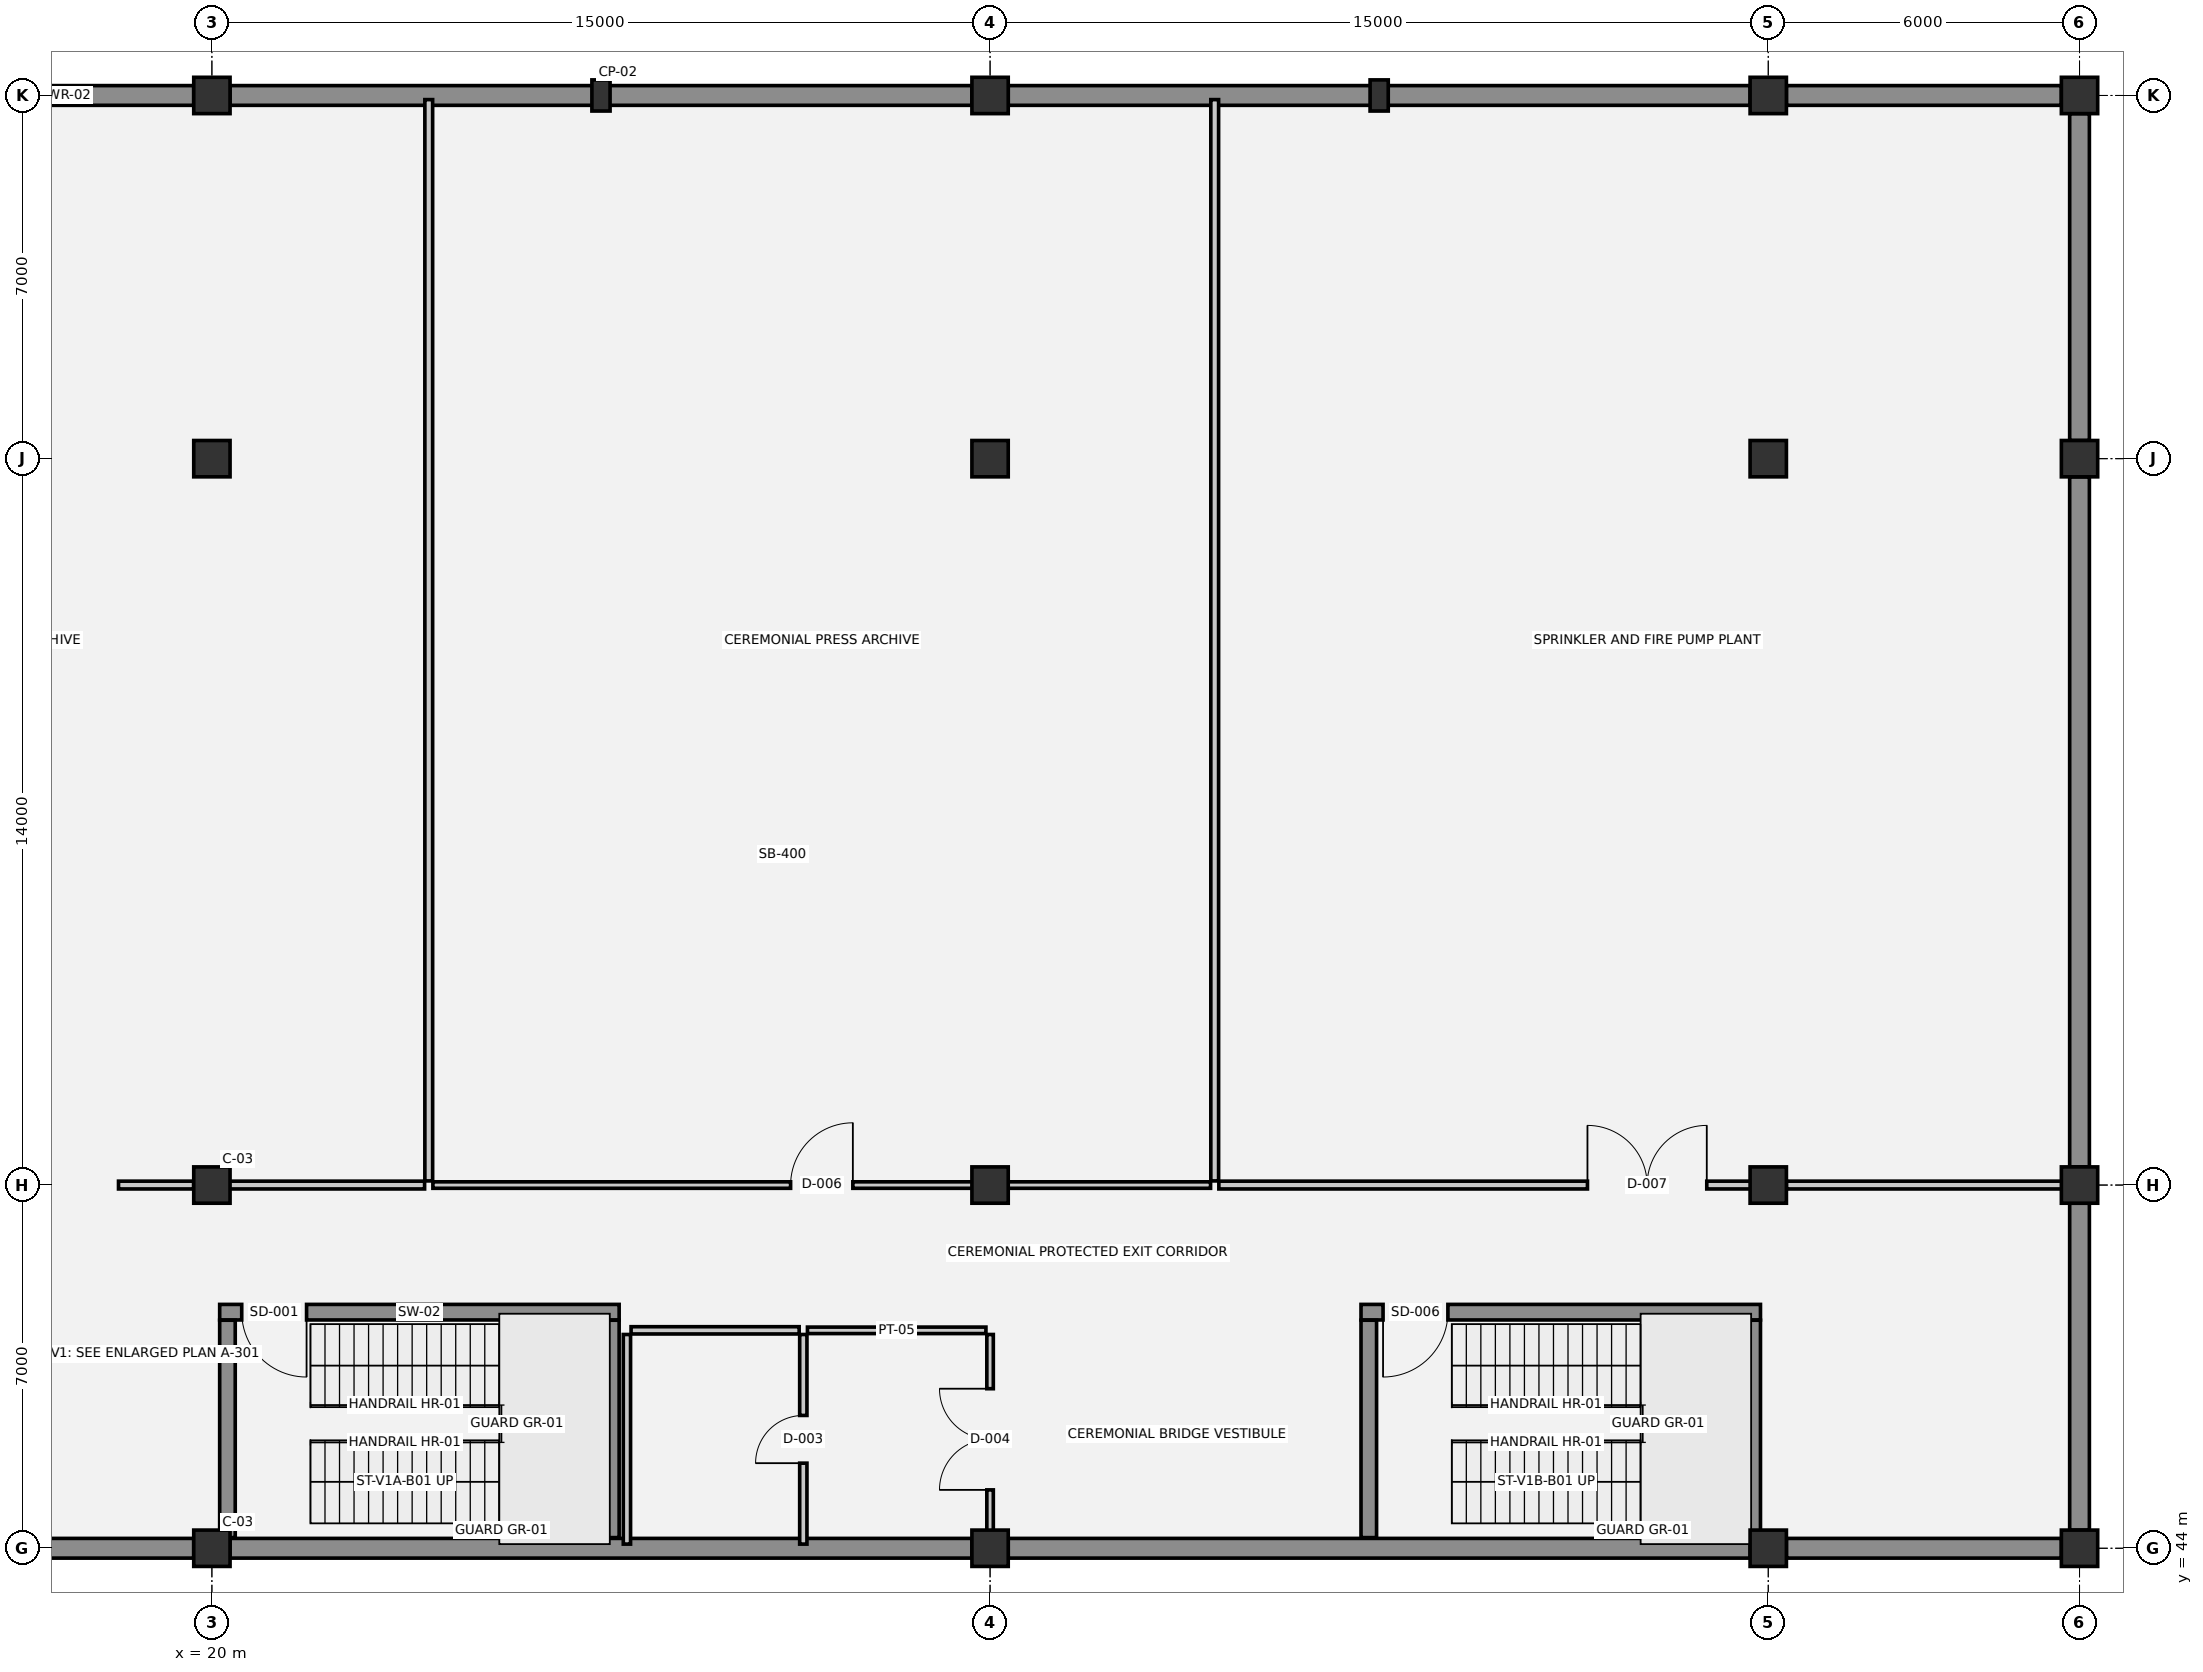
"""IFC4 building model, lengths in metres.
Left out: names, types, materials, properties, quantities, classifications, styles, units other than length and angle.
Written with IfcOpenShell. Run it as: python <this file> out.ifc"""

import sys

from ifc_helpers import new_model, si_unit, direction, frame, frame_2d, origin, origin_2d, place, context, subcontext, project, spatial, rectangle, extrude, element, fill, save


model = new_model("IFC4")
c1 = context("Model", 3, precision=1e-05, world=origin(), true_north=direction((0.0, 1.0)))
c2 = subcontext(c1, "Body", "Model", "MODEL_VIEW")
j1 = project(units=[si_unit("LENGTHUNIT", "METRE"), si_unit("PLANEANGLEUNIT", "RADIAN")], contexts=[c1])
p1 = place(None, origin())
s1 = spatial("IfcSite", under=j1, at=p1, CompositionType="ELEMENT")
p2 = place(p1, origin())
s2 = spatial("IfcBuilding", under=s1, at=p2, CompositionType="ELEMENT")
p3 = place(p2, frame((0.0, 0.0, -4.5)))
s3 = spatial("IfcBuildingStorey", under=s2, at=p3, CompositionType="ELEMENT", Elevation=-4.5)
for number, where, z_axis, x_axis in (
    (1, (20.0, 44.0, 0.0), (0.0, 0.0, 1.0), (1.0, 0.0, 0.0)),
    (2, (20.0, 51.0, 0.0), (0.0, 0.0, 1.0), (1.0, 0.0, 0.0)),
    (3, (20.0, 65.0, 0.0), (0.0, 0.0, 1.0), (1.0, 0.0, 0.0)),
    (4, (20.0, 72.0, 0.0), (0.0, 0.0, 1.0), (1.0, 0.0, 0.0)),
    (5, (35.0, 44.0, 0.0), (0.0, 0.0, 1.0), (1.0, 0.0, 0.0)),
    (6, (35.0, 51.0, 0.0), (0.0, 0.0, 1.0), (1.0, 0.0, 0.0)),
    (7, (35.0, 65.0, 0.0), (0.0, 0.0, 1.0), (1.0, 0.0, 0.0)),
    (8, (35.0, 72.0, 0.0), (0.0, 0.0, 1.0), (1.0, 0.0, 0.0)),
    (9, (50.0, 44.0, 0.0), (0.0, 0.0, 1.0), (1.0, 0.0, 0.0)),
    (10, (50.0, 51.0, 0.0), (0.0, 0.0, 1.0), (1.0, 0.0, 0.0)),
    (11, (50.0, 65.0, 0.0), (0.0, 0.0, 1.0), (1.0, 0.0, 0.0)),
    (12, (50.0, 72.0, 0.0), (0.0, 0.0, 1.0), (1.0, 0.0, 0.0)),
    (13, (56.0, 44.0, 0.0), (0.0, 0.0, 1.0), (1.0, 0.0, 0.0)),
    (14, (56.0, 51.0, 0.0), (0.0, 0.0, 1.0), (1.0, 0.0, 0.0)),
    (15, (56.0, 65.0, 0.0), (0.0, 0.0, 1.0), (1.0, 0.0, 0.0)),
    (16, (56.0, 72.0, 0.0), (0.0, 0.0, 1.0), (1.0, 0.0, 0.0)),
):
    element("IfcColumn", number, at=place(p3, frame(where, z_axis=z_axis, x_axis=x_axis)), inside=s3, PredefinedType="COLUMN", context=c2, shape_type="SweptSolid", body=[
        extrude(rectangle(XDim=0.7, YDim=0.7, at=origin_2d()), origin(), (0.0, 0.0, 1.0), 4.5),
    ])
for number, where, z_axis, x_axis in (
    (17, (27.5, 72.0, 0.0), (0.0, 0.0, 1.0), (1.0, 0.0, 0.0)),
    (18, (42.5, 72.0, 0.0), (0.0, 0.0, 1.0), (1.0, 0.0, 0.0)),
):
    element("IfcColumn", number, at=place(p3, frame(where, z_axis=z_axis, x_axis=x_axis)), inside=s3, PredefinedType="PILASTER", context=c2, shape_type="SweptSolid", body=[
        extrude(rectangle(XDim=0.35, YDim=0.6, at=origin_2d()), origin(), (0.0, 0.0, 1.0), 4.5),
    ])
p4 = place(p3, frame((14.85, 72.0, 0.0), z_axis=(0.0, 0.0, 1.0), x_axis=(1.0, 0.0, 0.0)))
e19 = element("IfcWall", 19, at=p4, inside=s3, PredefinedType="STANDARD", context=c2, shape_type="SweptSolid", body=[
    extrude(rectangle(XDim=4.8, YDim=0.38, at=frame_2d((2.4, 0.0))), origin(), (0.0, 0.0, 1.0), 4.24),
])
for number, where, z_axis, x_axis in (
    (20, (20.35, 72.0, 0.0), (0.0, 0.0, 1.0), (1.0, 0.0, 0.0)),
    (21, (35.35, 72.0, 0.0), (0.0, 0.0, 1.0), (1.0, 0.0, 0.0)),
):
    element("IfcWall", number, at=place(p3, frame(where, z_axis=z_axis, x_axis=x_axis)), inside=s3, PredefinedType="STANDARD", context=c2, shape_type="SweptSolid", body=[
        extrude(rectangle(XDim=14.3, YDim=0.38, at=frame_2d((7.15, 0.0))), origin(), (0.0, 0.0, 1.0), 4.24),
    ])
p5 = place(p3, frame((50.35, 72.0, 0.0), z_axis=(0.0, 0.0, 1.0), x_axis=(1.0, 0.0, 0.0)))
e22 = element("IfcWall", 22, at=p5, inside=s3, PredefinedType="STANDARD", context=c2, shape_type="SweptSolid", body=[
    extrude(rectangle(XDim=5.3, YDim=0.38, at=frame_2d((2.65, 0.0))), origin(), (0.0, 0.0, 1.0), 4.24),
])
p6 = place(p3, frame((56.0, 71.65, 0.0), z_axis=(0.0, 0.0, 1.0), x_axis=(0.0, -1.0, 0.0)))
e23 = element("IfcWall", 23, at=p6, inside=s3, PredefinedType="STANDARD", context=c2, shape_type="SweptSolid", body=[
    extrude(rectangle(XDim=6.3, YDim=0.38, at=frame_2d((3.15, 0.0))), origin(), (0.0, 0.0, 1.0), 4.24),
])
p7 = place(p3, frame((56.0, 64.65, 0.0), z_axis=(0.0, 0.0, 1.0), x_axis=(0.0, -1.0, 0.0)))
e24 = element("IfcWall", 24, at=p7, inside=s3, PredefinedType="STANDARD", context=c2, shape_type="SweptSolid", body=[
    extrude(rectangle(XDim=13.3, YDim=0.38, at=frame_2d((6.65, 0.0))), origin(), (0.0, 0.0, 1.0), 4.24),
])
p8 = place(p3, frame((56.0, 50.65, 0.0), z_axis=(0.0, 0.0, 1.0), x_axis=(0.0, -1.0, 0.0)))
e25 = element("IfcWall", 25, at=p8, inside=s3, PredefinedType="STANDARD", context=c2, shape_type="SweptSolid", body=[
    extrude(rectangle(XDim=6.3, YDim=0.38, at=frame_2d((3.15, 0.0))), origin(), (0.0, 0.0, 1.0), 4.24),
])
p9 = place(p3, frame((55.65, 44.0, 0.0), z_axis=(0.0, 0.0, 1.0), x_axis=(-1.0, 0.0, 0.0)))
e26 = element("IfcWall", 26, at=p9, inside=s3, PredefinedType="STANDARD", context=c2, shape_type="SweptSolid", body=[
    extrude(rectangle(XDim=5.3, YDim=0.38, at=frame_2d((2.65, 0.0))), origin(), (0.0, 0.0, 1.0), 4.24),
])
for number, where, z_axis, x_axis in (
    (27, (49.65, 44.0, 0.0), (0.0, 0.0, 1.0), (-1.0, 0.0, 0.0)),
    (28, (34.65, 44.0, 0.0), (0.0, 0.0, 1.0), (-1.0, 0.0, 0.0)),
):
    element("IfcWall", number, at=place(p3, frame(where, z_axis=z_axis, x_axis=x_axis)), inside=s3, PredefinedType="STANDARD", context=c2, shape_type="SweptSolid", body=[
        extrude(rectangle(XDim=14.3, YDim=0.38, at=frame_2d((7.15, 0.0))), origin(), (0.0, 0.0, 1.0), 4.24),
    ])
p10 = place(p3, frame((19.65, 44.0, 0.0), z_axis=(0.0, 0.0, 1.0), x_axis=(-1.0, 0.0, 0.0)))
e29 = element("IfcWall", 29, at=p10, inside=s3, PredefinedType="STANDARD", context=c2, shape_type="SweptSolid", body=[
    extrude(rectangle(XDim=4.8, YDim=0.38, at=frame_2d((2.4, 0.0))), origin(), (0.0, 0.0, 1.0), 4.24),
])
p11 = place(p3, frame((27.85, 48.55, 0.0), z_axis=(0.0, 0.0, 1.0), x_axis=(-1.0, 0.0, 0.0)))
e30 = element("IfcWall", 30, at=p11, inside=s3, PredefinedType="SHEAR", context=c2, shape_type="SweptSolid", body=[
    extrude(rectangle(XDim=7.7, YDim=0.3, at=frame_2d((3.85, 0.0))), origin(), (0.0, 0.0, 1.0), 4.24),
])
p12 = place(p11, frame((6.025, 0.0, 0.0)))
e31 = element("IfcOpeningElement", 31, at=p12, cuts=e30, PredefinedType="OPENING", context=c2, shape_type="SweptSolid", body=[
    extrude(rectangle(XDim=1.25, YDim=2.15, at=frame_2d((0.625, 1.075))), frame((0.0, 0.16, 0.0), z_axis=(0.0, -1.0, 0.0), x_axis=(1.0, 0.0, 0.0)), (0.0, 0.0, 1.0), 0.32),
])
for number, where, z_axis, x_axis in (
    (32, (20.3, 48.395, 0.0), (0.0, 0.0, 1.0), (0.0, -1.0, 0.0)),
    (33, (27.7, 44.205, 0.0), (0.0, 0.0, 1.0), (0.0, 1.0, 0.0)),
):
    element("IfcWall", number, at=place(p3, frame(where, z_axis=z_axis, x_axis=x_axis)), inside=s3, PredefinedType="SHEAR", context=c2, shape_type="SweptSolid", body=[
        extrude(rectangle(XDim=4.19, YDim=0.3, at=frame_2d((2.095, 0.0))), origin(), (0.0, 0.0, 1.0), 4.24),
    ])
p13 = place(p3, frame((49.85, 48.55, 0.0), z_axis=(0.0, 0.0, 1.0), x_axis=(-1.0, 0.0, 0.0)))
e34 = element("IfcWall", 34, at=p13, inside=s3, PredefinedType="SHEAR", context=c2, shape_type="SweptSolid", body=[
    extrude(rectangle(XDim=7.7, YDim=0.3, at=frame_2d((3.85, 0.0))), origin(), (0.0, 0.0, 1.0), 4.24),
])
p14 = place(p13, frame((6.025, 0.0, 0.0)))
e35 = element("IfcOpeningElement", 35, at=p14, cuts=e34, PredefinedType="OPENING", context=c2, shape_type="SweptSolid", body=[
    extrude(rectangle(XDim=1.25, YDim=2.15, at=frame_2d((0.625, 1.075))), frame((0.0, 0.16, 0.0), z_axis=(0.0, -1.0, 0.0), x_axis=(1.0, 0.0, 0.0)), (0.0, 0.0, 1.0), 0.32),
])
for number, where, z_axis, x_axis in (
    (36, (42.3, 48.395, 0.0), (0.0, 0.0, 1.0), (0.0, -1.0, 0.0)),
    (37, (49.7, 44.205, 0.0), (0.0, 0.0, 1.0), (0.0, 1.0, 0.0)),
):
    element("IfcWall", number, at=place(p3, frame(where, z_axis=z_axis, x_axis=x_axis)), inside=s3, PredefinedType="SHEAR", context=c2, shape_type="SweptSolid", body=[
        extrude(rectangle(XDim=4.19, YDim=0.3, at=frame_2d((2.095, 0.0))), origin(), (0.0, 0.0, 1.0), 4.24),
    ])
p15 = place(p3, frame((28.08, 48.2, 0.0), z_axis=(0.0, 0.0, 1.0), x_axis=(1.0, 0.0, 0.0)))
e38 = element("IfcWall", 38, at=p15, inside=s3, PredefinedType="PLUMBINGWALL", context=c2, shape_type="SweptSolid", body=[
    extrude(rectangle(XDim=3.24, YDim=0.14, at=frame_2d((1.62, 0.0))), origin(), (0.0, 0.0, 1.0), 4.14),
])
p16 = place(p3, frame((31.48, 48.2, 0.0), z_axis=(0.0, 0.0, 1.0), x_axis=(1.0, 0.0, 0.0)))
e39 = element("IfcWall", 39, at=p16, inside=s3, PredefinedType="PARTITIONING", context=c2, shape_type="SweptSolid", body=[
    extrude(rectangle(XDim=3.44, YDim=0.125, at=frame_2d((1.72, 0.0))), origin(), (0.0, 0.0, 1.0), 4.14),
])
p17 = place(p3, frame((18.2, 51.0, 0.0), z_axis=(0.0, 0.0, 1.0), x_axis=(1.0, 0.0, 0.0)))
e40 = element("IfcWall", 40, at=p17, inside=s3, PredefinedType="PARTITIONING", context=c2, shape_type="SweptSolid", body=[
    extrude(rectangle(XDim=1.45, YDim=0.15, at=frame_2d((0.725, 0.0))), origin(), (0.0, 0.0, 1.0), 3.53),
])
p18 = place(p3, frame((19.65, 51.0, 0.0), z_axis=(0.0, 0.0, 1.0), x_axis=(1.0, 0.0, 0.0)))
e41 = element("IfcWall", 41, at=p18, inside=s3, PredefinedType="PARTITIONING", context=c2, shape_type="SweptSolid", body=[
    extrude(rectangle(XDim=4.45, YDim=0.15, at=frame_2d((2.225, 0.0))), origin(), (0.0, 0.0, 1.0), 3.28),
])
p19 = place(p3, frame((24.26, 51.0, 0.0), z_axis=(0.0, 0.0, 1.0), x_axis=(1.0, 0.0, 0.0)))
e42 = element("IfcWall", 42, at=p19, inside=s3, PredefinedType="PARTITIONING", context=c2, shape_type="SweptSolid", body=[
    extrude(rectangle(XDim=14.99, YDim=0.125, at=frame_2d((7.495, 0.0))), origin(), (0.0, 0.0, 1.0), 3.28),
])
p20 = place(p19, frame((6.895, 0.0, 0.0)))
e43 = element("IfcOpeningElement", 43, at=p20, cuts=e42, PredefinedType="OPENING", context=c2, shape_type="SweptSolid", body=[
    extrude(rectangle(XDim=1.2, YDim=2.15, at=frame_2d((0.6, 1.075))), frame((0.0, 0.073, 0.0), z_axis=(0.0, -1.0, 0.0), x_axis=(1.0, 0.0, 0.0)), (0.0, 0.0, 1.0), 0.145),
])
p21 = place(p3, frame((39.41, 51.0, 0.0), z_axis=(0.0, 0.0, 1.0), x_axis=(1.0, 0.0, 0.0)))
e44 = element("IfcWall", 44, at=p21, inside=s3, PredefinedType="PARTITIONING", context=c2, shape_type="SweptSolid", body=[
    extrude(rectangle(XDim=10.94, YDim=0.15, at=frame_2d((5.47, 0.0))), origin(), (0.0, 0.0, 1.0), 3.28),
])
p22 = place(p21, frame((7.105, 0.0, 0.0)))
e45 = element("IfcOpeningElement", 45, at=p22, cuts=e44, PredefinedType="OPENING", context=c2, shape_type="SweptSolid", body=[
    extrude(rectangle(XDim=2.3, YDim=2.4, at=frame_2d((1.15, 1.2))), frame((0.0, 0.085, 0.0), z_axis=(0.0, -1.0, 0.0), x_axis=(1.0, 0.0, 0.0)), (0.0, 0.0, 1.0), 0.17),
])
p23 = place(p3, frame((50.35, 51.0, 0.0), z_axis=(0.0, 0.0, 1.0), x_axis=(1.0, 0.0, 0.0)))
e46 = element("IfcWall", 46, at=p23, inside=s3, PredefinedType="PARTITIONING", context=c2, shape_type="SweptSolid", body=[
    extrude(rectangle(XDim=5.57, YDim=0.15, at=frame_2d((2.785, 0.0))), origin(), (0.0, 0.0, 1.0), 3.53),
])
p24 = place(p3, frame((24.18, 51.08, 0.0), z_axis=(0.0, 0.0, 1.0), x_axis=(0.0, 1.0, 0.0)))
e47 = element("IfcWall", 47, at=p24, inside=s3, PredefinedType="PARTITIONING", context=c2, shape_type="SweptSolid", body=[
    extrude(rectangle(XDim=20.84, YDim=0.15, at=frame_2d((10.42, 0.0))), origin(), (0.0, 0.0, 1.0), 4.14),
])
p25 = place(p3, frame((28.0, 44.08, 0.0), z_axis=(0.0, 0.0, 1.0), x_axis=(0.0, 1.0, 0.0)))
e48 = element("IfcWall", 48, at=p25, inside=s3, PredefinedType="PLUMBINGWALL", context=c2, shape_type="SweptSolid", body=[
    extrude(rectangle(XDim=4.04, YDim=0.14, at=frame_2d((2.02, 0.0))), origin(), (0.0, 0.0, 1.0), 4.14),
])
p26 = place(p3, frame((31.4, 44.08, 0.0), z_axis=(0.0, 0.0, 1.0), x_axis=(0.0, 1.0, 0.0)))
e49 = element("IfcWall", 49, at=p26, inside=s3, PredefinedType="PLUMBINGWALL", context=c2, shape_type="SweptSolid", body=[
    extrude(rectangle(XDim=4.04, YDim=0.14, at=frame_2d((2.02, 0.0))), origin(), (0.0, 0.0, 1.0), 4.14),
])
p27 = place(p26, frame((1.56, 0.0, 0.0)))
e50 = element("IfcOpeningElement", 50, at=p27, cuts=e49, PredefinedType="OPENING", context=c2, shape_type="SweptSolid", body=[
    extrude(rectangle(XDim=0.92, YDim=2.1, at=frame_2d((0.46, 1.05))), frame((0.0, 0.08, 0.0), z_axis=(0.0, -1.0, 0.0), x_axis=(1.0, 0.0, 0.0)), (0.0, 0.0, 1.0), 0.16),
])
p28 = place(p3, frame((35.0, 44.08, 0.0), z_axis=(0.0, 0.0, 1.0), x_axis=(0.0, 1.0, 0.0)))
e51 = element("IfcWall", 51, at=p28, inside=s3, PredefinedType="PARTITIONING", context=c2, shape_type="SweptSolid", body=[
    extrude(rectangle(XDim=4.04, YDim=0.125, at=frame_2d((2.02, 0.0))), origin(), (0.0, 0.0, 1.0), 3.58),
])
p29 = place(p28, frame((1.045, 0.0, 0.0)))
e52 = element("IfcOpeningElement", 52, at=p29, cuts=e51, PredefinedType="OPENING", context=c2, shape_type="SweptSolid", body=[
    extrude(rectangle(XDim=1.95, YDim=2.35, at=frame_2d((0.975, 1.175))), frame((0.0, 0.073, 0.0), z_axis=(0.0, -1.0, 0.0), x_axis=(1.0, 0.0, 0.0)), (0.0, 0.0, 1.0), 0.145),
])
p30 = place(p3, frame((39.33, 51.08, 0.0), z_axis=(0.0, 0.0, 1.0), x_axis=(0.0, 1.0, 0.0)))
e53 = element("IfcWall", 53, at=p30, inside=s3, PredefinedType="PARTITIONING", context=c2, shape_type="SweptSolid", body=[
    extrude(rectangle(XDim=20.84, YDim=0.15, at=frame_2d((10.42, 0.0))), origin(), (0.0, 0.0, 1.0), 4.14),
])
p31 = place(p12, origin())
e54 = element("IfcDoor", 54, at=p31, inside=s3, OperationType="SINGLE_SWING_LEFT", PredefinedType="DOOR", context=c2, shape_type="SweptSolid", body=[
    extrude(rectangle(XDim=1.25, YDim=2.15, at=frame_2d((0.625, 1.075))), frame((0.0, 0.025, 0.0), z_axis=(0.0, -1.0, 0.0), x_axis=(1.0, 0.0, 0.0)), (0.0, 0.0, 1.0), 0.05),
])
fill(e31, e54)
p32 = place(p14, origin())
e55 = element("IfcDoor", 55, at=p32, inside=s3, OperationType="SINGLE_SWING_RIGHT", PredefinedType="DOOR", context=c2, shape_type="SweptSolid", body=[
    extrude(rectangle(XDim=1.25, YDim=2.15, at=frame_2d((0.625, 1.075))), frame((0.0, 0.025, 0.0), z_axis=(0.0, -1.0, 0.0), x_axis=(1.0, 0.0, 0.0)), (0.0, 0.0, 1.0), 0.05),
])
fill(e35, e55)
p33 = place(p27, origin())
e56 = element("IfcDoor", 56, at=p33, inside=s3, OperationType="SINGLE_SWING_LEFT", PredefinedType="DOOR", context=c2, shape_type="SweptSolid", body=[
    extrude(rectangle(XDim=0.92, YDim=2.1, at=frame_2d((0.46, 1.05))), frame((0.0, 0.025, 0.0), z_axis=(0.0, -1.0, 0.0), x_axis=(1.0, 0.0, 0.0)), (0.0, 0.0, 1.0), 0.05),
])
fill(e50, e56)
p34 = place(p29, origin())
e57 = element("IfcDoor", 57, at=p34, inside=s3, OperationType="DOUBLE_DOOR_SINGLE_SWING", PredefinedType="DOOR", context=c2, shape_type="SweptSolid", body=[
    extrude(rectangle(XDim=1.95, YDim=2.35, at=frame_2d((0.975, 1.175))), frame((0.0, 0.025, 0.0), z_axis=(0.0, -1.0, 0.0), x_axis=(1.0, 0.0, 0.0)), (0.0, 0.0, 1.0), 0.05),
])
fill(e52, e57)
p35 = place(p20, origin())
e58 = element("IfcDoor", 58, at=p35, inside=s3, OperationType="SINGLE_SWING_RIGHT", PredefinedType="DOOR", context=c2, shape_type="SweptSolid", body=[
    extrude(rectangle(XDim=1.2, YDim=2.15, at=frame_2d((0.6, 1.075))), frame((0.0, 0.025, 0.0), z_axis=(0.0, -1.0, 0.0), x_axis=(1.0, 0.0, 0.0)), (0.0, 0.0, 1.0), 0.05),
])
fill(e43, e58)
p36 = place(p22, origin())
e59 = element("IfcDoor", 59, at=p36, inside=s3, OperationType="DOUBLE_DOOR_SINGLE_SWING", PredefinedType="DOOR", context=c2, shape_type="SweptSolid", body=[
    extrude(rectangle(XDim=2.3, YDim=2.4, at=frame_2d((1.15, 1.2))), frame((0.0, 0.025, 0.0), z_axis=(0.0, -1.0, 0.0), x_axis=(1.0, 0.0, 0.0)), (0.0, 0.0, 1.0), 0.05),
])
fill(e45, e59)
save(model, sys.argv[1])
